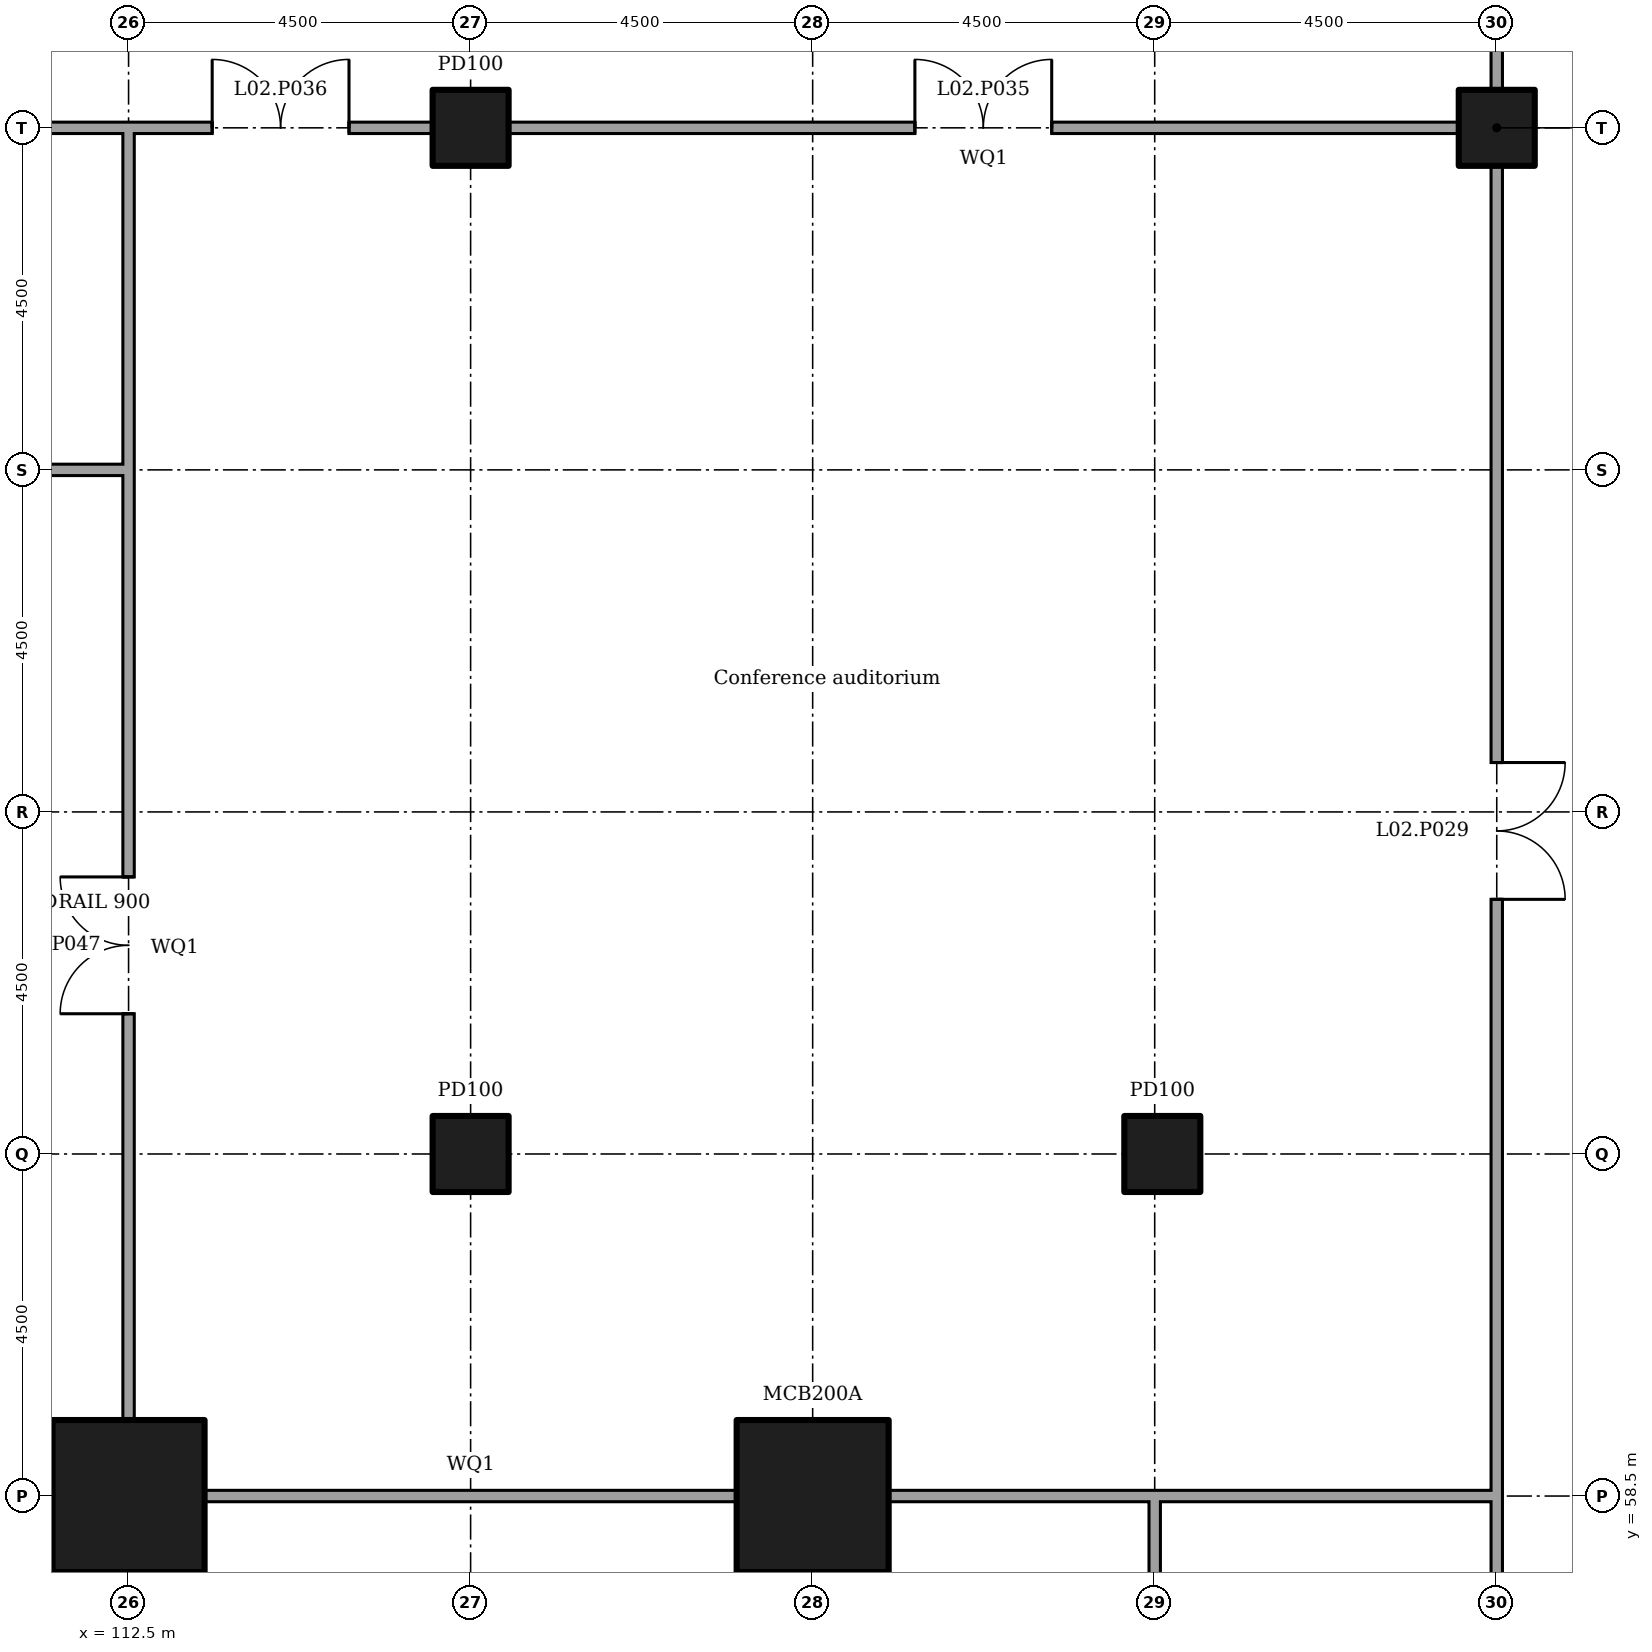
"""IFC4 building model, lengths in metres.
Left out: names, types, materials, properties, quantities, classifications, styles, units other than length and angle.
Written with IfcOpenShell. Run it as: python <this file> out.ifc"""

import sys

from ifc_helpers import new_model, si_unit, direction, frame, frame_2d, origin, origin_2d, place, context, subcontext, project, spatial, rectangle, extrude, element, fill, save


model = new_model("IFC4")
c1 = context("Model", 3, precision=1e-05, world=origin(), true_north=direction((0.0, 1.0)))
c2 = subcontext(c1, "Body", "Model", "MODEL_VIEW")
j1 = project(units=[si_unit("LENGTHUNIT", "METRE"), si_unit("PLANEANGLEUNIT", "RADIAN")], contexts=[c1])
p1 = place(None, origin())
s1 = spatial("IfcSite", under=j1, at=p1, CompositionType="ELEMENT")
p2 = place(p1, origin())
s2 = spatial("IfcBuilding", under=s1, at=p2, CompositionType="ELEMENT")
p3 = place(p2, frame((0.0, 0.0, 11.5)))
s3 = spatial("IfcBuildingStorey", under=s2, at=p3, CompositionType="ELEMENT", Elevation=11.5)
for number, where in (
    (1, (112.5, 58.5, 0.0)),
    (2, (121.5, 58.5, 0.0)),
):
    element("IfcColumn", number, at=place(p3, frame(where)), inside=s3, PredefinedType="COLUMN", context=c2, shape_type="SweptSolid", body=[
        extrude(rectangle(XDim=2.0, YDim=2.0, at=origin_2d()), origin(), (0.0, 0.0, 1.0), 5.0),
    ])
for number, where in (
    (3, (117.0, 63.0, 0.0)),
    (4, (117.0, 76.5, 0.0)),
    (5, (126.1, 63.0, 0.0)),
    (6, (130.5, 76.5, 0.0)),
):
    element("IfcColumn", number, at=place(p3, frame(where)), inside=s3, PredefinedType="COLUMN", context=c2, shape_type="SweptSolid", body=[
        extrude(rectangle(XDim=1.0, YDim=1.0, at=origin_2d()), origin(), (0.0, 0.0, 1.0), 5.0),
    ])
p4 = place(p3, frame((130.5, 76.995, 0.0), z_axis=(0.0, 0.0, 1.0), x_axis=(0.0, 1.0, 0.0)))
e7 = element("IfcWall", 7, at=p4, inside=s3, PredefinedType="PARTITIONING", context=c2, shape_type="SweptSolid", body=[
    extrude(rectangle(XDim=3.705, YDim=0.15, at=frame_2d((1.853, 0.0))), origin(), (0.0, 0.0, 1.0), 4.55),
])
p5 = place(p4, frame((1.25, 0.0, 0.0)))
e8 = element("IfcOpeningElement", 8, at=p5, cuts=e7, PredefinedType="OPENING", context=c2, shape_type="SweptSolid", body=[
    extrude(rectangle(XDim=1.2, YDim=2.1, at=frame_2d((0.6, 1.05))), frame((0.0, 0.085, 0.0), z_axis=(0.0, -1.0, 0.0), x_axis=(1.0, 0.0, 0.0)), (0.0, 0.0, 1.0), 0.17),
])
p6 = place(p3, frame((130.5, 36.495, 0.0), z_axis=(0.0, 0.0, 1.0), x_axis=(0.0, 1.0, 0.0)))
e9 = element("IfcWall", 9, at=p6, inside=s3, PredefinedType="PARTITIONING", context=c2, shape_type="SweptSolid", body=[
    extrude(rectangle(XDim=22.08, YDim=0.15, at=frame_2d((11.04, 0.0))), origin(), (0.0, 0.0, 1.0), 4.55),
])
p7 = place(p6, frame((10.5, 0.0, 0.0)))
e10 = element("IfcOpeningElement", 10, at=p7, cuts=e9, PredefinedType="OPENING", context=c2, shape_type="SweptSolid", body=[
    extrude(rectangle(XDim=1.0, YDim=2.1, at=frame_2d((0.5, 1.05))), frame((0.0, 0.085, 0.0), z_axis=(0.0, -1.0, 0.0), x_axis=(1.0, 0.0, 0.0)), (0.0, 0.0, 1.0), 0.17),
])
p8 = place(p3, frame((130.5, 58.5, 0.0), z_axis=(0.0, 0.0, 1.0), x_axis=(0.0, 1.0, 0.0)))
e11 = element("IfcWall", 11, at=p8, inside=s3, PredefinedType="PARTITIONING", context=c2, shape_type="SweptSolid", body=[
    extrude(rectangle(XDim=17.505, YDim=0.15, at=frame_2d((8.752, 0.0))), origin(), (0.0, 0.0, 1.0), 4.55),
])
p9 = place(p8, frame((7.85, 0.0, 0.0)))
e12 = element("IfcOpeningElement", 12, at=p9, cuts=e11, PredefinedType="OPENING", context=c2, shape_type="SweptSolid", body=[
    extrude(rectangle(XDim=1.8, YDim=2.1, at=frame_2d((0.9, 1.05))), frame((0.0, 0.085, 0.0), z_axis=(0.0, -1.0, 0.0), x_axis=(1.0, 0.0, 0.0)), (0.0, 0.0, 1.0), 0.17),
])
p10 = place(p3, frame((103.995, 76.5, 0.0)))
e13 = element("IfcWall", 13, at=p10, inside=s3, PredefinedType="PARTITIONING", context=c2, shape_type="SweptSolid", body=[
    extrude(rectangle(XDim=8.58, YDim=0.15, at=frame_2d((4.29, 0.0))), origin(), (0.0, 0.0, 1.0), 4.55),
])
p11 = place(p3, frame((112.5, 76.5, 0.0)))
e14 = element("IfcWall", 14, at=p11, inside=s3, PredefinedType="PARTITIONING", context=c2, shape_type="SweptSolid", body=[
    extrude(rectangle(XDim=4.005, YDim=0.15, at=frame_2d((2.002, 0.0))), origin(), (0.0, 0.0, 1.0), 4.55),
])
p12 = place(p11, frame((1.1, 0.0, 0.0)))
e15 = element("IfcOpeningElement", 15, at=p12, cuts=e14, PredefinedType="OPENING", context=c2, shape_type="SweptSolid", body=[
    extrude(rectangle(XDim=1.8, YDim=2.1, at=frame_2d((0.9, 1.05))), frame((0.0, 0.085, 0.0), z_axis=(0.0, -1.0, 0.0), x_axis=(1.0, 0.0, 0.0)), (0.0, 0.0, 1.0), 0.17),
])
p13 = place(p3, frame((117.495, 76.5, 0.0)))
e16 = element("IfcWall", 16, at=p13, inside=s3, PredefinedType="PARTITIONING", context=c2, shape_type="SweptSolid", body=[
    extrude(rectangle(XDim=12.51, YDim=0.15, at=frame_2d((6.255, 0.0))), origin(), (0.0, 0.0, 1.0), 4.55),
])
p14 = place(p13, frame((5.35, 0.0, 0.0)))
e17 = element("IfcOpeningElement", 17, at=p14, cuts=e16, PredefinedType="OPENING", context=c2, shape_type="SweptSolid", body=[
    extrude(rectangle(XDim=1.8, YDim=2.1, at=frame_2d((0.9, 1.05))), frame((0.0, 0.085, 0.0), z_axis=(0.0, -1.0, 0.0), x_axis=(1.0, 0.0, 0.0)), (0.0, 0.0, 1.0), 0.17),
])
p15 = place(p3, frame((126.0, 54.995, 0.0), z_axis=(0.0, 0.0, 1.0), x_axis=(0.0, 1.0, 0.0)))
e18 = element("IfcWall", 18, at=p15, inside=s3, PredefinedType="PARTITIONING", context=c2, shape_type="SweptSolid", body=[
    extrude(rectangle(XDim=3.58, YDim=0.15, at=frame_2d((1.79, 0.0))), origin(), (0.0, 0.0, 1.0), 4.55),
])
p16 = place(p3, frame((99.995, 58.5, 0.0)))
e19 = element("IfcWall", 19, at=p16, inside=s3, PredefinedType="PARTITIONING", context=c2, shape_type="SweptSolid", body=[
    extrude(rectangle(XDim=11.51, YDim=0.15, at=frame_2d((5.755, 0.0))), origin(), (0.0, 0.0, 1.0), 4.55),
])
p17 = place(p3, frame((113.495, 58.5, 0.0)))
e20 = element("IfcWall", 20, at=p17, inside=s3, PredefinedType="PARTITIONING", context=c2, shape_type="SweptSolid", body=[
    extrude(rectangle(XDim=7.01, YDim=0.15, at=frame_2d((3.505, 0.0))), origin(), (0.0, 0.0, 1.0), 4.55),
])
p18 = place(p3, frame((122.495, 58.5, 0.0)))
e21 = element("IfcWall", 21, at=p18, inside=s3, PredefinedType="PARTITIONING", context=c2, shape_type="SweptSolid", body=[
    extrude(rectangle(XDim=3.505, YDim=0.15, at=frame_2d((1.752, 0.0))), origin(), (0.0, 0.0, 1.0), 4.55),
])
p19 = place(p3, frame((126.075, 58.5, 0.0)))
e22 = element("IfcWall", 22, at=p19, inside=s3, PredefinedType="PARTITIONING", context=c2, shape_type="SweptSolid", body=[
    extrude(rectangle(XDim=4.35, YDim=0.15, at=frame_2d((2.175, 0.0))), origin(), (0.0, 0.0, 1.0), 4.55),
])
p20 = place(p3, frame((103.5, 72.0, 0.0)))
e23 = element("IfcWall", 23, at=p20, inside=s3, PredefinedType="PARTITIONING", context=c2, shape_type="SweptSolid", body=[
    extrude(rectangle(XDim=9.075, YDim=0.15, at=frame_2d((4.538, 0.0))), origin(), (0.0, 0.0, 1.0), 4.55),
])
p21 = place(p20, frame((6.25, 0.0, 0.0)))
e24 = element("IfcOpeningElement", 24, at=p21, cuts=e23, PredefinedType="OPENING", context=c2, shape_type="SweptSolid", body=[
    extrude(rectangle(XDim=1.0, YDim=2.1, at=frame_2d((0.5, 1.05))), frame((0.0, 0.085, 0.0), z_axis=(0.0, -1.0, 0.0), x_axis=(1.0, 0.0, 0.0)), (0.0, 0.0, 1.0), 0.17),
])
p22 = place(p3, frame((112.5, 59.495, 0.0), z_axis=(0.0, 0.0, 1.0), x_axis=(0.0, 1.0, 0.0)))
e25 = element("IfcWall", 25, at=p22, inside=s3, PredefinedType="PARTITIONING", context=c2, shape_type="SweptSolid", body=[
    extrude(rectangle(XDim=12.43, YDim=0.15, at=frame_2d((6.215, 0.0))), origin(), (0.0, 0.0, 1.0), 4.55),
])
p23 = place(p22, frame((5.35, 0.0, 0.0)))
e26 = element("IfcOpeningElement", 26, at=p23, cuts=e25, PredefinedType="OPENING", context=c2, shape_type="SweptSolid", body=[
    extrude(rectangle(XDim=1.8, YDim=2.1, at=frame_2d((0.9, 1.05))), frame((0.0, 0.085, 0.0), z_axis=(0.0, -1.0, 0.0), x_axis=(1.0, 0.0, 0.0)), (0.0, 0.0, 1.0), 0.17),
])
p24 = place(p3, frame((112.5, 72.0, 0.0), z_axis=(0.0, 0.0, 1.0), x_axis=(0.0, 1.0, 0.0)))
e27 = element("IfcWall", 27, at=p24, inside=s3, PredefinedType="PARTITIONING", context=c2, shape_type="SweptSolid", body=[
    extrude(rectangle(XDim=4.425, YDim=0.15, at=frame_2d((2.212, 0.0))), origin(), (0.0, 0.0, 1.0), 4.55),
])
p25 = place(p9, frame((1.8, 0.0, 0.0), x_axis=(-1.0, 0.0, 0.0)))
e28 = element("IfcDoor", 28, at=p25, inside=s3, OperationType="DOUBLE_DOOR_SINGLE_SWING", PredefinedType="DOOR", context=c2, shape_type="SweptSolid", body=[
    extrude(rectangle(XDim=1.8, YDim=2.1, at=frame_2d((0.9, 1.05))), frame((0.0, 0.025, 0.0), z_axis=(0.0, -1.0, 0.0), x_axis=(1.0, 0.0, 0.0)), (0.0, 0.0, 1.0), 0.05),
])
fill(e12, e28)
p26 = place(p14, origin())
e29 = element("IfcDoor", 29, at=p26, inside=s3, OperationType="DOUBLE_DOOR_SINGLE_SWING", PredefinedType="DOOR", context=c2, shape_type="SweptSolid", body=[
    extrude(rectangle(XDim=1.8, YDim=2.1, at=frame_2d((0.9, 1.05))), frame((0.0, 0.025, 0.0), z_axis=(0.0, -1.0, 0.0), x_axis=(1.0, 0.0, 0.0)), (0.0, 0.0, 1.0), 0.05),
])
fill(e17, e29)
p27 = place(p12, origin())
e30 = element("IfcDoor", 30, at=p27, inside=s3, OperationType="DOUBLE_DOOR_SINGLE_SWING", PredefinedType="DOOR", context=c2, shape_type="SweptSolid", body=[
    extrude(rectangle(XDim=1.8, YDim=2.1, at=frame_2d((0.9, 1.05))), frame((0.0, 0.025, 0.0), z_axis=(0.0, -1.0, 0.0), x_axis=(1.0, 0.0, 0.0)), (0.0, 0.0, 1.0), 0.05),
])
fill(e15, e30)
p28 = place(p23, origin())
e31 = element("IfcDoor", 31, at=p28, inside=s3, OperationType="DOUBLE_DOOR_SINGLE_SWING", PredefinedType="DOOR", context=c2, shape_type="SweptSolid", body=[
    extrude(rectangle(XDim=1.8, YDim=2.1, at=frame_2d((0.9, 1.05))), frame((0.0, 0.025, 0.0), z_axis=(0.0, -1.0, 0.0), x_axis=(1.0, 0.0, 0.0)), (0.0, 0.0, 1.0), 0.05),
])
fill(e26, e31)
save(model, sys.argv[1])
